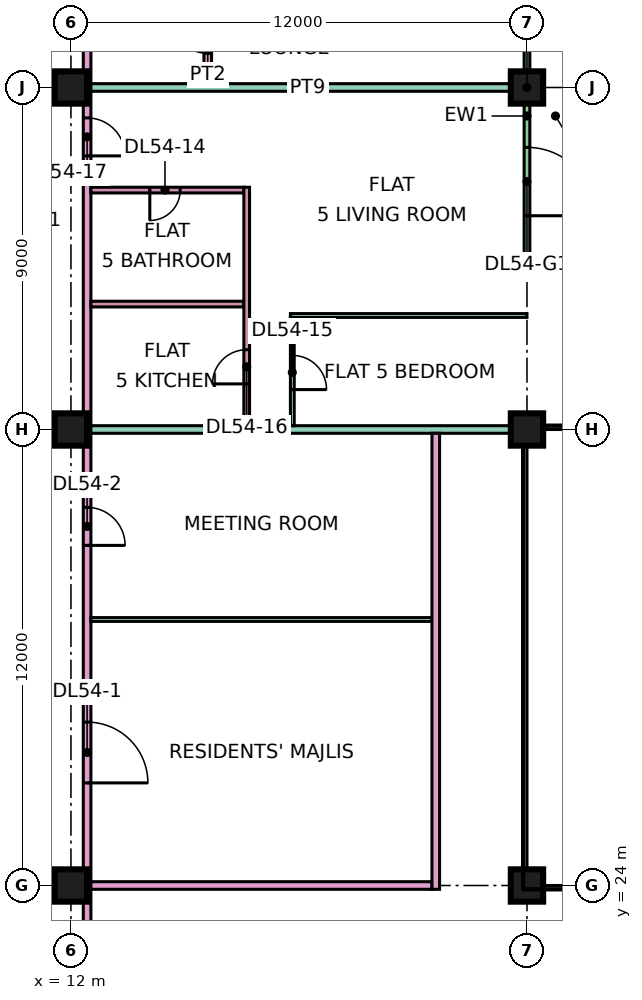
"""IFC4 building model, lengths in metres.
Left out: names, types, materials, properties, quantities, classifications, styles, units other than length and angle.
Written with IfcOpenShell. Run it as: python <this file> out.ifc"""

import sys

from ifc_helpers import new_model, si_unit, direction, frame, frame_2d, origin, origin_2d, place, context, subcontext, project, spatial, rectangle, extrude, element, fill, save


model = new_model("IFC4")
c1 = context("Model", 3, precision=1e-05, world=origin(), true_north=direction((0.0, 1.0)))
c2 = subcontext(c1, "Body", "Model", "MODEL_VIEW")
j1 = project(units=[si_unit("LENGTHUNIT", "METRE"), si_unit("PLANEANGLEUNIT", "RADIAN")], contexts=[c1])
p1 = place(None, origin())
s1 = spatial("IfcSite", under=j1, at=p1, CompositionType="ELEMENT")
p2 = place(p1, origin())
s2 = spatial("IfcBuilding", under=s1, at=p2, CompositionType="ELEMENT")
p3 = place(p2, frame((0.0, 0.0, 230.4)))
s3 = spatial("IfcBuildingStorey", under=s2, at=p3, CompositionType="ELEMENT", Elevation=230.4)
for number, where, z_axis, x_axis in (
    (1, (12.0, 24.0, 0.0), (0.0, 0.0, 1.0), (1.0, 0.0, 0.0)),
    (2, (12.0, 36.0, 0.0), (0.0, 0.0, 1.0), (1.0, 0.0, 0.0)),
    (3, (12.0, 45.0, 0.0), (0.0, 0.0, 1.0), (1.0, 0.0, 0.0)),
    (4, (24.0, 24.0, 0.0), (0.0, 0.0, 1.0), (1.0, 0.0, 0.0)),
    (5, (24.0, 36.0, 0.0), (0.0, 0.0, 1.0), (1.0, 0.0, 0.0)),
    (6, (24.0, 45.0, 0.0), (0.0, 0.0, 1.0), (1.0, 0.0, 0.0)),
):
    element("IfcColumn", number, at=place(p3, frame(where, z_axis=z_axis, x_axis=x_axis)), inside=s3, PredefinedType="COLUMN", context=c2, shape_type="SweptSolid", body=[
        extrude(rectangle(XDim=0.85, YDim=0.85, at=origin_2d()), origin(), (0.0, 0.0, 1.0), 3.75),
    ])
p4 = place(p3, frame((24.0, 40.575, 0.0), z_axis=(0.0, 0.0, 1.0), x_axis=(0.0, 1.0, 0.0)))
e7 = element("IfcWall", 7, at=p4, inside=s3, PredefinedType="SOLIDWALL", context=c2, shape_type="SweptSolid", body=[
    extrude(rectangle(XDim=7.35, YDim=0.15, at=frame_2d((3.675, 0.0))), origin(), (0.0, 0.0, 1.0), 3.35),
])
p5 = place(p4, frame((1.05, 0.0, 0.0)))
e8 = element("IfcOpeningElement", 8, at=p5, cuts=e7, PredefinedType="OPENING", context=c2, shape_type="SweptSolid", body=[
    extrude(rectangle(XDim=1.8, YDim=2.4, at=frame_2d((0.9, 1.2))), frame((0.0, 0.085, 0.0), z_axis=(0.0, -1.0, 0.0), x_axis=(1.0, 0.0, 0.0)), (0.0, 0.0, 1.0), 0.17),
])
p6 = place(p4, frame((5.55, 0.0, 0.45)))
e9 = element("IfcOpeningElement", 9, at=p6, cuts=e7, PredefinedType="OPENING", context=c2, shape_type="SweptSolid", body=[
    extrude(rectangle(XDim=1.2, YDim=2.4, at=frame_2d((0.6, 1.2))), frame((0.0, 0.085, 0.0), z_axis=(0.0, -1.0, 0.0), x_axis=(1.0, 0.0, 0.0)), (0.0, 0.0, 1.0), 0.17),
])
p7 = place(p3, frame((25.5, 40.5, 0.0), z_axis=(0.0, 0.0, 1.0), x_axis=(-1.0, 0.0, 0.0)))
e10 = element("IfcWall", 10, at=p7, inside=s3, PredefinedType="SOLIDWALL", context=c2, shape_type="SweptSolid", body=[
    extrude(rectangle(XDim=1.5, YDim=0.15, at=frame_2d((0.75, 0.0))), origin(), (0.0, 0.0, 1.0), 3.35),
])
p8 = place(p3, frame((12.425, 20.0, 0.0), z_axis=(0.0, 0.0, 1.0), x_axis=(0.0, 1.0, 0.0)))
e11 = element("IfcWall", 11, at=p8, inside=s3, PredefinedType="PARTITIONING", context=c2, shape_type="SweptSolid", body=[
    extrude(rectangle(XDim=42.926, YDim=0.2, at=frame_2d((21.463, 0.0))), origin(), (0.0, 0.0, 1.0), 3.35),
])
p9 = place(p8, frame((6.7, 0.0, 0.0)))
e12 = element("IfcOpeningElement", 12, at=p9, cuts=e11, PredefinedType="OPENING", context=c2, shape_type="SweptSolid", body=[
    extrude(rectangle(XDim=1.6, YDim=2.1, at=frame_2d((0.8, 1.05))), frame((0.0, 0.11, 0.0), z_axis=(0.0, -1.0, 0.0), x_axis=(1.0, 0.0, 0.0)), (0.0, 0.0, 1.0), 0.22),
])
p10 = place(p8, frame((12.95, 0.0, 0.0)))
e13 = element("IfcOpeningElement", 13, at=p10, cuts=e11, PredefinedType="OPENING", context=c2, shape_type="SweptSolid", body=[
    extrude(rectangle(XDim=1.0, YDim=2.1, at=frame_2d((0.5, 1.05))), frame((0.0, 0.11, 0.0), z_axis=(0.0, -1.0, 0.0), x_axis=(1.0, 0.0, 0.0)), (0.0, 0.0, 1.0), 0.22),
])
p11 = place(p8, frame((23.2, 0.0, 0.0)))
e14 = element("IfcOpeningElement", 14, at=p11, cuts=e11, PredefinedType="OPENING", context=c2, shape_type="SweptSolid", body=[
    extrude(rectangle(XDim=1.0, YDim=2.1, at=frame_2d((0.5, 1.05))), frame((0.0, 0.11, 0.0), z_axis=(0.0, -1.0, 0.0), x_axis=(1.0, 0.0, 0.0)), (0.0, 0.0, 1.0), 0.22),
])
p12 = place(p8, frame((35.35, 0.0, 0.0)))
e15 = element("IfcOpeningElement", 15, at=p12, cuts=e11, PredefinedType="OPENING", context=c2, shape_type="SweptSolid", body=[
    extrude(rectangle(XDim=1.0, YDim=2.1, at=frame_2d((0.5, 1.05))), frame((0.0, 0.11, 0.0), z_axis=(0.0, -1.0, 0.0), x_axis=(1.0, 0.0, 0.0)), (0.0, 0.0, 1.0), 0.22),
])
p13 = place(p8, frame((1.15, 0.0, 0.0)))
e16 = element("IfcOpeningElement", 16, at=p13, cuts=e11, PredefinedType="OPENING", context=c2, shape_type="SweptSolid", body=[
    extrude(rectangle(XDim=1.8, YDim=2.1, at=frame_2d((0.9, 1.05))), frame((0.0, 0.11, 0.0), z_axis=(0.0, -1.0, 0.0), x_axis=(1.0, 0.0, 0.0)), (0.0, 0.0, 1.0), 0.22),
])
p14 = place(p8, frame((28.6, 0.0, 0.0)))
e17 = element("IfcOpeningElement", 17, at=p14, cuts=e11, PredefinedType="OPENING", context=c2, shape_type="SweptSolid", body=[
    extrude(rectangle(XDim=1.8, YDim=2.1, at=frame_2d((0.9, 1.05))), frame((0.0, 0.11, 0.0), z_axis=(0.0, -1.0, 0.0), x_axis=(1.0, 0.0, 0.0)), (0.0, 0.0, 1.0), 0.22),
])
p15 = place(p3, frame((12.525, 24.0, 0.0), z_axis=(0.0, 0.0, 1.0), x_axis=(1.0, 0.0, 0.0)))
e18 = element("IfcWall", 18, at=p15, inside=s3, PredefinedType="PARTITIONING", context=c2, shape_type="SweptSolid", body=[
    extrude(rectangle(XDim=8.975, YDim=0.2, at=frame_2d((4.488, 0.0))), origin(), (0.0, 0.0, 1.0), 3.35),
])
p16 = place(p3, frame((12.525, 31.0, 0.0), z_axis=(0.0, 0.0, 1.0), x_axis=(1.0, 0.0, 0.0)))
e19 = element("IfcWall", 19, at=p16, inside=s3, PredefinedType="PARTITIONING", context=c2, shape_type="SweptSolid", body=[
    extrude(rectangle(XDim=8.975, YDim=0.1, at=frame_2d((4.488, 0.0))), origin(), (0.0, 0.0, 1.0), 3.35),
])
p17 = place(p3, frame((12.525, 36.0, 0.0), z_axis=(0.0, 0.0, 1.0), x_axis=(1.0, 0.0, 0.0)))
e20 = element("IfcWall", 20, at=p17, inside=s3, PredefinedType="PARTITIONING", context=c2, shape_type="SweptSolid", body=[
    extrude(rectangle(XDim=11.475, YDim=0.2, at=frame_2d((5.738, 0.0))), origin(), (0.0, 0.0, 1.0), 3.35),
])
p18 = place(p3, frame((12.525, 39.3, 0.0), z_axis=(0.0, 0.0, 1.0), x_axis=(1.0, 0.0, 0.0)))
e21 = element("IfcWall", 21, at=p18, inside=s3, PredefinedType="PARTITIONING", context=c2, shape_type="SweptSolid", body=[
    extrude(rectangle(XDim=4.025, YDim=0.15, at=frame_2d((2.013, 0.0))), origin(), (0.0, 0.0, 1.0), 3.35),
])
p19 = place(p3, frame((12.525, 42.3, 0.0), z_axis=(0.0, 0.0, 1.0), x_axis=(1.0, 0.0, 0.0)))
e22 = element("IfcWall", 22, at=p19, inside=s3, PredefinedType="PARTITIONING", context=c2, shape_type="SweptSolid", body=[
    extrude(rectangle(XDim=4.025, YDim=0.15, at=frame_2d((2.013, 0.0))), origin(), (0.0, 0.0, 1.0), 3.35),
])
p20 = place(p19, frame((1.55, 0.0, 0.0)))
e23 = element("IfcOpeningElement", 23, at=p20, cuts=e22, PredefinedType="OPENING", context=c2, shape_type="SweptSolid", body=[
    extrude(rectangle(XDim=0.8, YDim=2.1, at=frame_2d((0.4, 1.05))), frame((0.0, 0.085, 0.0), z_axis=(0.0, -1.0, 0.0), x_axis=(1.0, 0.0, 0.0)), (0.0, 0.0, 1.0), 0.17),
])
p21 = place(p3, frame((12.525, 45.0, 0.0), z_axis=(0.0, 0.0, 1.0), x_axis=(1.0, 0.0, 0.0)))
e24 = element("IfcWall", 24, at=p21, inside=s3, PredefinedType="PARTITIONING", context=c2, shape_type="SweptSolid", body=[
    extrude(rectangle(XDim=11.401, YDim=0.2, at=frame_2d((5.701, 0.0))), origin(), (0.0, 0.0, 1.0), 3.35),
])
p22 = place(p3, frame((15.6, 45.1, 0.0), z_axis=(0.0, 0.0, 1.0), x_axis=(0.0, 1.0, 0.0)))
e25 = element("IfcWall", 25, at=p22, inside=s3, PredefinedType="PARTITIONING", context=c2, shape_type="SweptSolid", body=[
    extrude(rectangle(XDim=2.675, YDim=0.2, at=frame_2d((1.337, 0.0))), origin(), (0.0, 0.0, 1.0), 3.35),
])
p23 = place(p22, frame((0.8, 0.0, 0.0)))
e26 = element("IfcOpeningElement", 26, at=p23, cuts=e25, PredefinedType="OPENING", context=c2, shape_type="SweptSolid", body=[
    extrude(rectangle(XDim=1.0, YDim=2.1, at=frame_2d((0.5, 1.05))), frame((0.0, 0.11, 0.0), z_axis=(0.0, -1.0, 0.0), x_axis=(1.0, 0.0, 0.0)), (0.0, 0.0, 1.0), 0.22),
])
p24 = place(p3, frame((16.625, 36.1, 0.0), z_axis=(0.0, 0.0, 1.0), x_axis=(0.0, 1.0, 0.0)))
e27 = element("IfcWall", 27, at=p24, inside=s3, PredefinedType="PARTITIONING", context=c2, shape_type="SweptSolid", body=[
    extrude(rectangle(XDim=6.275, YDim=0.15, at=frame_2d((3.137, 0.0))), origin(), (0.0, 0.0, 1.0), 3.35),
])
p25 = place(p24, frame((1.1, 0.0, 0.0)))
e28 = element("IfcOpeningElement", 28, at=p25, cuts=e27, PredefinedType="OPENING", context=c2, shape_type="SweptSolid", body=[
    extrude(rectangle(XDim=0.9, YDim=2.1, at=frame_2d((0.45, 1.05))), frame((0.0, 0.085, 0.0), z_axis=(0.0, -1.0, 0.0), x_axis=(1.0, 0.0, 0.0)), (0.0, 0.0, 1.0), 0.17),
])
p26 = place(p3, frame((17.775, 39.0, 0.0), z_axis=(0.0, 0.0, 1.0), x_axis=(1.0, 0.0, 0.0)))
e29 = element("IfcWall", 29, at=p26, inside=s3, PredefinedType="PARTITIONING", context=c2, shape_type="SweptSolid", body=[
    extrude(rectangle(XDim=6.225, YDim=0.1, at=frame_2d((3.113, 0.0))), origin(), (0.0, 0.0, 1.0), 3.35),
])
p27 = place(p3, frame((17.825, 36.1, 0.0), z_axis=(0.0, 0.0, 1.0), x_axis=(0.0, 1.0, 0.0)))
e30 = element("IfcWall", 30, at=p27, inside=s3, PredefinedType="PARTITIONING", context=c2, shape_type="SweptSolid", body=[
    extrude(rectangle(XDim=2.85, YDim=0.1, at=frame_2d((1.425, 0.0))), origin(), (0.0, 0.0, 1.0), 3.35),
])
p28 = place(p27, frame((0.95, 0.0, 0.0)))
e31 = element("IfcOpeningElement", 31, at=p28, cuts=e30, PredefinedType="OPENING", context=c2, shape_type="SweptSolid", body=[
    extrude(rectangle(XDim=0.9, YDim=2.1, at=frame_2d((0.45, 1.05))), frame((0.0, 0.06, 0.0), z_axis=(0.0, -1.0, 0.0), x_axis=(1.0, 0.0, 0.0)), (0.0, 0.0, 1.0), 0.12),
])
p29 = place(p3, frame((21.6, 23.9, 0.0), z_axis=(0.0, 0.0, 1.0), x_axis=(0.0, 1.0, 0.0)))
e32 = element("IfcWall", 32, at=p29, inside=s3, PredefinedType="PARTITIONING", context=c2, shape_type="SweptSolid", body=[
    extrude(rectangle(XDim=12.0, YDim=0.2, at=frame_2d((6.0, 0.0))), origin(), (0.0, 0.0, 1.0), 3.35),
])
p30 = place(p5, frame((1.8, 0.0, 0.0), z_axis=(0.0, 0.0, 1.0), x_axis=(-1.0, 0.0, 0.0)))
e33 = element("IfcDoor", 33, at=p30, inside=s3, OperationType="DOUBLE_DOOR_SINGLE_SWING", PredefinedType="DOOR", context=c2, shape_type="SweptSolid", body=[
    extrude(rectangle(XDim=1.8, YDim=2.4, at=frame_2d((0.9, 1.2))), frame((0.0, 0.025, 0.0), z_axis=(0.0, -1.0, 0.0), x_axis=(1.0, 0.0, 0.0)), (0.0, 0.0, 1.0), 0.05),
])
fill(e8, e33)
p31 = place(p9, frame((1.6, 0.0, 0.0), z_axis=(0.0, 0.0, 1.0), x_axis=(-1.0, 0.0, 0.0)))
e34 = element("IfcDoor", 34, at=p31, inside=s3, OperationType="DOUBLE_DOOR_SINGLE_SWING", PredefinedType="DOOR", context=c2, shape_type="SweptSolid", body=[
    extrude(rectangle(XDim=1.6, YDim=2.1, at=frame_2d((0.8, 1.05))), frame((0.0, 0.025, 0.0), z_axis=(0.0, -1.0, 0.0), x_axis=(1.0, 0.0, 0.0)), (0.0, 0.0, 1.0), 0.05),
])
fill(e12, e34)
p32 = place(p10, frame((1.0, 0.0, 0.0), z_axis=(0.0, 0.0, 1.0), x_axis=(-1.0, 0.0, 0.0)))
e35 = element("IfcDoor", 35, at=p32, inside=s3, OperationType="SINGLE_SWING_LEFT", PredefinedType="DOOR", context=c2, shape_type="SweptSolid", body=[
    extrude(rectangle(XDim=1.0, YDim=2.1, at=frame_2d((0.5, 1.05))), frame((0.0, 0.025, 0.0), z_axis=(0.0, -1.0, 0.0), x_axis=(1.0, 0.0, 0.0)), (0.0, 0.0, 1.0), 0.05),
])
fill(e13, e35)
p33 = place(p20, frame((0.8, 0.0, 0.0), z_axis=(0.0, 0.0, 1.0), x_axis=(-1.0, 0.0, 0.0)))
e36 = element("IfcDoor", 36, at=p33, inside=s3, OperationType="SINGLE_SWING_LEFT", PredefinedType="DOOR", context=c2, shape_type="SweptSolid", body=[
    extrude(rectangle(XDim=0.8, YDim=2.1, at=frame_2d((0.4, 1.05))), frame((0.0, 0.025, 0.0), z_axis=(0.0, -1.0, 0.0), x_axis=(1.0, 0.0, 0.0)), (0.0, 0.0, 1.0), 0.05),
])
fill(e23, e36)
p34 = place(p28, frame((0.9, 0.0, 0.0), z_axis=(0.0, 0.0, 1.0), x_axis=(-1.0, 0.0, 0.0)))
e37 = element("IfcDoor", 37, at=p34, inside=s3, OperationType="SINGLE_SWING_LEFT", PredefinedType="DOOR", context=c2, shape_type="SweptSolid", body=[
    extrude(rectangle(XDim=0.9, YDim=2.1, at=frame_2d((0.45, 1.05))), frame((0.0, 0.025, 0.0), z_axis=(0.0, -1.0, 0.0), x_axis=(1.0, 0.0, 0.0)), (0.0, 0.0, 1.0), 0.05),
])
fill(e31, e37)
p35 = place(p25, origin())
e38 = element("IfcDoor", 38, at=p35, inside=s3, OperationType="SINGLE_SWING_LEFT", PredefinedType="DOOR", context=c2, shape_type="SweptSolid", body=[
    extrude(rectangle(XDim=0.9, YDim=2.1, at=frame_2d((0.45, 1.05))), frame((0.0, 0.025, 0.0), z_axis=(0.0, -1.0, 0.0), x_axis=(1.0, 0.0, 0.0)), (0.0, 0.0, 1.0), 0.05),
])
fill(e28, e38)
p36 = place(p11, frame((1.0, 0.0, 0.0), z_axis=(0.0, 0.0, 1.0), x_axis=(-1.0, 0.0, 0.0)))
e39 = element("IfcDoor", 39, at=p36, inside=s3, OperationType="SINGLE_SWING_LEFT", PredefinedType="DOOR", context=c2, shape_type="SweptSolid", body=[
    extrude(rectangle(XDim=1.0, YDim=2.1, at=frame_2d((0.5, 1.05))), frame((0.0, 0.025, 0.0), z_axis=(0.0, -1.0, 0.0), x_axis=(1.0, 0.0, 0.0)), (0.0, 0.0, 1.0), 0.05),
])
fill(e14, e39)
p37 = place(p23, frame((1.0, 0.0, 0.0), z_axis=(0.0, 0.0, 1.0), x_axis=(-1.0, 0.0, 0.0)))
e40 = element("IfcDoor", 40, at=p37, inside=s3, OperationType="SINGLE_SWING_RIGHT", PredefinedType="DOOR", context=c2, shape_type="SweptSolid", body=[
    extrude(rectangle(XDim=1.0, YDim=2.1, at=frame_2d((0.5, 1.05))), frame((0.0, 0.025, 0.0), z_axis=(0.0, -1.0, 0.0), x_axis=(1.0, 0.0, 0.0)), (0.0, 0.0, 1.0), 0.05),
])
fill(e26, e40)
save(model, sys.argv[1])
